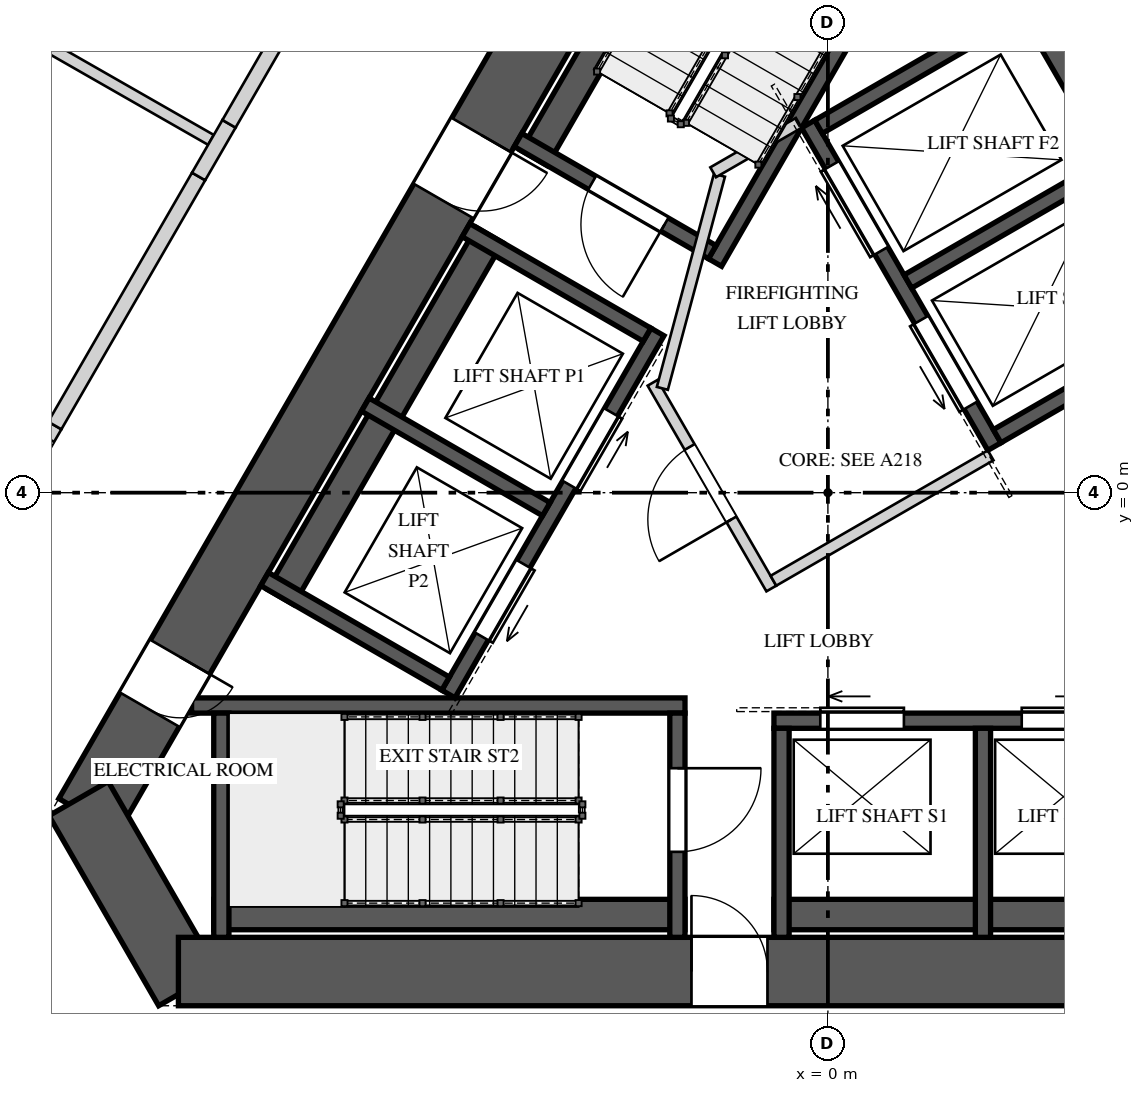
"""IFC4 building model, lengths in metres.
Left out: names, types, materials, properties, quantities, classifications, styles, units other than length and angle.
Written with IfcOpenShell. Run it as: python <this file> out.ifc"""

import sys

from ifc_helpers import new_model, si_unit, direction, frame, frame_2d, origin, place, context, subcontext, project, spatial, polyline, rectangle, outline, extrude, element, fill, save


model = new_model("IFC4")
c1 = context("Model", 3, precision=1e-05, world=origin(), true_north=direction((0.0, 1.0)))
c2 = subcontext(c1, "Body", "Model", "MODEL_VIEW")
j1 = project(units=[si_unit("LENGTHUNIT", "METRE"), si_unit("PLANEANGLEUNIT", "RADIAN")], contexts=[c1])
p1 = place(None, origin())
s1 = spatial("IfcSite", under=j1, at=p1, CompositionType="ELEMENT")
p2 = place(p1, origin())
s2 = spatial("IfcBuilding", under=s1, at=p2, CompositionType="ELEMENT")
p3 = place(p2, frame((0.0, 0.0, 125.6)))
s3 = spatial("IfcBuildingStorey", under=s2, at=p3, CompositionType="ELEMENT", Elevation=125.6)
p4 = place(p3, frame((-1.184, 10.55, 0.0), z_axis=(0.0, 0.0, 1.0), x_axis=(-0.500004814304, -0.866022624227, 0.0)))
e1 = element("IfcWall", 1, at=p4, inside=s3, PredefinedType="SHEAR", context=c2, shape_type="SweptSolid", body=[
    extrude(rectangle(XDim=17.09, YDim=0.9, at=frame_2d((8.545, 0.0))), origin(), (0.0, 0.0, 1.0), 4.0),
])
p5 = place(p4, frame((6.75, 0.0, 0.0)))
e2 = element("IfcOpeningElement", 2, at=p5, cuts=e1, PredefinedType="OPENING", context=c2, shape_type="SweptSolid", body=[
    extrude(rectangle(XDim=1.0, YDim=2.4, at=frame_2d((0.5, 1.2))), frame((0.0, 0.46, 0.0), z_axis=(0.0, -1.0, 0.0), x_axis=(1.0, 0.0, 0.0)), (0.0, 0.0, 1.0), 0.92),
])
p6 = place(p4, frame((14.678, 0.0, 0.0)))
e3 = element("IfcOpeningElement", 3, at=p6, cuts=e1, PredefinedType="OPENING", context=c2, shape_type="SweptSolid", body=[
    extrude(rectangle(XDim=0.8, YDim=2.1, at=frame_2d((0.4, 1.05))), frame((0.0, 0.46, 0.0), z_axis=(0.0, -1.0, 0.0), x_axis=(1.0, 0.0, 0.0)), (0.0, 0.0, 1.0), 0.92),
])
p7 = place(p3, frame((-9.858, -4.025, 0.0), z_axis=(0.0, 0.0, 1.0), x_axis=(0.500059191753, -0.865991226713, 0.0)))
e4 = element("IfcWall", 4, at=p7, inside=s3, PredefinedType="SHEAR", context=c2, shape_type="SweptSolid", body=[
    extrude(rectangle(XDim=2.887, YDim=0.9, at=frame_2d((1.443, 0.0))), origin(), (0.0, 0.0, 1.0), 4.0),
])
p8 = place(p3, frame((-8.545, -6.3, 0.0), z_axis=(0.0, 0.0, 1.0), x_axis=(1.0, 0.0, 0.0)))
e5 = element("IfcWall", 5, at=p8, inside=s3, PredefinedType="SHEAR", context=c2, shape_type="SweptSolid", body=[
    extrude(rectangle(XDim=17.09, YDim=0.9, at=frame_2d((8.545, 0.0))), origin(), (0.0, 0.0, 1.0), 4.0),
])
p9 = place(p8, frame((6.75, 0.0, 0.0)))
e6 = element("IfcOpeningElement", 6, at=p9, cuts=e5, PredefinedType="OPENING", context=c2, shape_type="SweptSolid", body=[
    extrude(rectangle(XDim=1.0, YDim=2.4, at=frame_2d((0.5, 1.2))), frame((0.0, 0.46, 0.0), z_axis=(0.0, -1.0, 0.0), x_axis=(1.0, 0.0, 0.0)), (0.0, 0.0, 1.0), 0.92),
])
p10 = place(p8, frame((14.678, 0.0, 0.0)))
e7 = element("IfcOpeningElement", 7, at=p10, cuts=e5, PredefinedType="OPENING", context=c2, shape_type="SweptSolid", body=[
    extrude(rectangle(XDim=0.8, YDim=2.1, at=frame_2d((0.4, 1.05))), frame((0.0, 0.46, 0.0), z_axis=(0.0, -1.0, 0.0), x_axis=(1.0, 0.0, 0.0)), (0.0, 0.0, 1.0), 0.92),
])
p11 = place(p3, frame((9.729, -4.25, 0.0), z_axis=(0.0, 0.0, 1.0), x_axis=(-0.500004814304, 0.866022624227, 0.0)))
e8 = element("IfcWall", 8, at=p11, inside=s3, PredefinedType="SHEAR", context=c2, shape_type="SweptSolid", body=[
    extrude(rectangle(XDim=17.09, YDim=0.9, at=frame_2d((8.545, 0.0))), origin(), (0.0, 0.0, 1.0), 4.0),
])
p12 = place(p11, frame((6.82, 0.0, 0.0)))
e9 = element("IfcOpeningElement", 9, at=p12, cuts=e8, PredefinedType="OPENING", context=c2, shape_type="SweptSolid", body=[
    extrude(rectangle(XDim=1.0, YDim=2.4, at=frame_2d((0.5, 1.2))), frame((0.0, 0.46, 0.0), z_axis=(0.0, -1.0, 0.0), x_axis=(1.0, 0.0, 0.0)), (0.0, 0.0, 1.0), 0.92),
])
p13 = place(p3, frame((-0.766, 9.772, 0.0), z_axis=(0.0, 0.0, 1.0), x_axis=(-0.500009909098, -0.866019682689, 0.0)))
e10 = element("IfcWall", 10, at=p13, inside=s3, PredefinedType="SOLIDWALL", context=c2, shape_type="SweptSolid", body=[
    extrude(rectangle(XDim=6.2, YDim=0.4, at=frame_2d((3.1, 0.0))), origin(), (0.0, 0.0, 1.0), 3.65),
])
p14 = place(p3, frame((1.761, 8.65, 0.0), z_axis=(0.0, 0.0, 1.0), x_axis=(-0.500010023241, -0.866019616786, 0.0)))
e11 = element("IfcWall", 11, at=p14, inside=s3, PredefinedType="SOLIDWALL", context=c2, shape_type="SweptSolid", body=[
    extrude(rectangle(XDim=6.491, YDim=0.2, at=frame_2d((3.246, 0.0))), origin(), (0.0, 0.0, 1.0), 3.65),
])
p15 = place(p3, frame((-1.521, 3.165, 0.0), z_axis=(0.0, 0.0, 1.0), x_axis=(-0.866039495442, 0.49997559174, 0.0)))
e12 = element("IfcWall", 12, at=p15, inside=s3, PredefinedType="SOLIDWALL", context=c2, shape_type="SweptSolid", body=[
    extrude(rectangle(XDim=2.95, YDim=0.2, at=frame_2d((1.475, 0.0))), origin(), (0.0, 0.0, 1.0), 3.65),
])
p16 = place(p15, frame((0.725, 0.0, 0.0)))
e13 = element("IfcOpeningElement", 13, at=p16, cuts=e12, PredefinedType="OPENING", context=c2, shape_type="SweptSolid", body=[
    extrude(rectangle(XDim=1.1, YDim=2.4, at=frame_2d((0.55, 1.2))), frame((0.0, 0.11, 0.0), z_axis=(0.0, -1.0, 0.0), x_axis=(1.0, 0.0, 0.0)), (0.0, 0.0, 1.0), 0.22),
])
p17 = place(p3, frame((-8.08, -5.55, 0.0), z_axis=(0.0, 0.0, 1.0), x_axis=(1.0, 0.0, 0.0)))
e14 = element("IfcWall", 14, at=p17, inside=s3, PredefinedType="SOLIDWALL", context=c2, shape_type="SweptSolid", body=[
    extrude(rectangle(XDim=6.2, YDim=0.4, at=frame_2d((3.1, 0.0))), origin(), (0.0, 0.0, 1.0), 3.65),
])
p18 = place(p3, frame((-8.372, -2.8, 0.0), z_axis=(0.0, 0.0, 1.0), x_axis=(1.0, 0.0, 0.0)))
e15 = element("IfcWall", 15, at=p18, inside=s3, PredefinedType="SOLIDWALL", context=c2, shape_type="SweptSolid", body=[
    extrude(rectangle(XDim=6.492, YDim=0.2, at=frame_2d((3.246, 0.0))), origin(), (0.0, 0.0, 1.0), 3.65),
])
p19 = place(p3, frame((-7.98, -2.9, 0.0), z_axis=(0.0, 0.0, 1.0), x_axis=(0.0, -1.0, 0.0)))
e16 = element("IfcWall", 16, at=p19, inside=s3, PredefinedType="SOLIDWALL", context=c2, shape_type="SweptSolid", body=[
    extrude(rectangle(XDim=2.95, YDim=0.2, at=frame_2d((1.475, 0.0))), origin(), (0.0, 0.0, 1.0), 3.65),
])
p20 = place(p3, frame((-1.98, -2.9, 0.0), z_axis=(0.0, 0.0, 1.0), x_axis=(0.0, -1.0, 0.0)))
e17 = element("IfcWall", 17, at=p20, inside=s3, PredefinedType="SOLIDWALL", context=c2, shape_type="SweptSolid", body=[
    extrude(rectangle(XDim=2.95, YDim=0.2, at=frame_2d((1.475, 0.0))), origin(), (0.0, 0.0, 1.0), 3.65),
])
p21 = place(p20, frame((0.725, 0.0, 0.0)))
e18 = element("IfcOpeningElement", 18, at=p21, cuts=e17, PredefinedType="OPENING", context=c2, shape_type="SweptSolid", body=[
    extrude(rectangle(XDim=1.1, YDim=2.4, at=frame_2d((0.55, 1.2))), frame((0.0, 0.11, 0.0), z_axis=(0.0, -1.0, 0.0), x_axis=(1.0, 0.0, 0.0)), (0.0, 0.0, 1.0), 0.22),
])
p22 = place(p3, frame((-2.243, 2.115, 0.0), z_axis=(0.0, 0.0, 1.0), x_axis=(-0.499996545922, -0.866027397988, 0.0)))
e19 = element("IfcWall", 19, at=p22, inside=s3, PredefinedType="SOLIDWALL", context=c2, shape_type="SweptSolid", body=[
    extrude(rectangle(XDim=5.5, YDim=0.2, at=frame_2d((2.75, 0.0))), origin(), (0.0, 0.0, 1.0), 3.65),
])
p23 = place(p22, frame((1.22, 0.0, 0.0)))
e20 = element("IfcOpeningElement", 20, at=p23, cuts=e19, PredefinedType="OPENING", context=c2, shape_type="SweptSolid", body=[
    extrude(rectangle(XDim=1.1, YDim=2.1, at=frame_2d((0.55, 1.05))), frame((0.0, 0.11, 0.0), z_axis=(0.0, -1.0, 0.0), x_axis=(1.0, 0.0, 0.0)), (0.0, 0.0, 1.0), 0.22),
])
p24 = place(p22, frame((3.525, 0.0, 0.0)))
e21 = element("IfcOpeningElement", 21, at=p24, cuts=e19, PredefinedType="OPENING", context=c2, shape_type="SweptSolid", body=[
    extrude(rectangle(XDim=1.1, YDim=2.1, at=frame_2d((0.55, 1.05))), frame((0.0, 0.11, 0.0), z_axis=(0.0, -1.0, 0.0), x_axis=(1.0, 0.0, 0.0)), (0.0, 0.0, 1.0), 0.22),
])
p25 = place(p3, frame((-4.451, 3.39, 0.0), z_axis=(0.0, 0.0, 1.0), x_axis=(-0.499996545922, -0.866027397988, 0.0)))
e22 = element("IfcWall", 22, at=p25, inside=s3, PredefinedType="SOLIDWALL", context=c2, shape_type="SweptSolid", body=[
    extrude(rectangle(XDim=5.5, YDim=0.4, at=frame_2d((2.75, 0.0))), origin(), (0.0, 0.0, 1.0), 3.65),
])
for number, where, z_axis, x_axis in (
    (23, (-2.38, 2.078, 0.0), (0.0, 0.0, 1.0), (-0.866, 0.5, 0.0)),
    (24, (-3.705, -0.217, 0.0), (0.0, 0.0, 1.0), (-0.866, 0.5, 0.0)),
):
    element("IfcWall", number, at=place(p3, frame(where, z_axis=z_axis, x_axis=x_axis)), inside=s3, PredefinedType="SOLIDWALL", context=c2, shape_type="SweptSolid", body=[
        extrude(rectangle(XDim=2.75, YDim=0.2, at=frame_2d((1.375, 0.0))), origin(), (0.0, 0.0, 1.0), 3.65),
    ])
p26 = place(p3, frame((-5.03, -2.512, 0.0), z_axis=(0.0, 0.0, 1.0), x_axis=(-0.866005201286, 0.500034990121, 0.0)))
e25 = element("IfcWall", 25, at=p26, inside=s3, PredefinedType="SOLIDWALL", context=c2, shape_type="SweptSolid", body=[
    extrude(rectangle(XDim=2.75, YDim=0.2, at=frame_2d((1.375, 0.0))), origin(), (0.0, 0.0, 1.0), 3.65),
])
p27 = place(p3, frame((-0.71, -3.0, 0.0), z_axis=(0.0, 0.0, 1.0), x_axis=(1.0, 0.0, 0.0)))
e26 = element("IfcWall", 26, at=p27, inside=s3, PredefinedType="SOLIDWALL", context=c2, shape_type="SweptSolid", body=[
    extrude(rectangle(XDim=5.5, YDim=0.2, at=frame_2d((2.75, 0.0))), origin(), (0.0, 0.0, 1.0), 3.65),
])
p28 = place(p27, frame((0.61, 0.0, 0.0)))
e27 = element("IfcOpeningElement", 27, at=p28, cuts=e26, PredefinedType="OPENING", context=c2, shape_type="SweptSolid", body=[
    extrude(rectangle(XDim=1.1, YDim=2.1, at=frame_2d((0.55, 1.05))), frame((0.0, 0.11, 0.0), z_axis=(0.0, -1.0, 0.0), x_axis=(1.0, 0.0, 0.0)), (0.0, 0.0, 1.0), 0.22),
])
p29 = place(p27, frame((3.26, 0.0, 0.0)))
e28 = element("IfcOpeningElement", 28, at=p29, cuts=e26, PredefinedType="OPENING", context=c2, shape_type="SweptSolid", body=[
    extrude(rectangle(XDim=1.1, YDim=2.1, at=frame_2d((0.55, 1.05))), frame((0.0, 0.11, 0.0), z_axis=(0.0, -1.0, 0.0), x_axis=(1.0, 0.0, 0.0)), (0.0, 0.0, 1.0), 0.22),
])
p30 = place(p3, frame((-0.71, -5.55, 0.0), z_axis=(0.0, 0.0, 1.0), x_axis=(1.0, 0.0, 0.0)))
e29 = element("IfcWall", 29, at=p30, inside=s3, PredefinedType="SOLIDWALL", context=c2, shape_type="SweptSolid", body=[
    extrude(rectangle(XDim=5.5, YDim=0.4, at=frame_2d((2.75, 0.0))), origin(), (0.0, 0.0, 1.0), 3.65),
])
for number, where, z_axis, x_axis in (
    (30, (-0.61, -3.1, 0.0), (0.0, 0.0, 1.0), (0.0, -1.0, 0.0)),
    (31, (2.04, -3.1, 0.0), (0.0, 0.0, 1.0), (0.0, -1.0, 0.0)),
):
    element("IfcWall", number, at=place(p3, frame(where, z_axis=z_axis, x_axis=x_axis)), inside=s3, PredefinedType="SOLIDWALL", context=c2, shape_type="SweptSolid", body=[
        extrude(rectangle(XDim=2.75, YDim=0.2, at=frame_2d((1.375, 0.0))), origin(), (0.0, 0.0, 1.0), 3.65),
    ])
p31 = place(p3, frame((2.19, 0.606, 0.0), z_axis=(0.0, 0.0, 1.0), x_axis=(-0.500002801628, 0.866023786258, 0.0)))
e32 = element("IfcWall", 32, at=p31, inside=s3, PredefinedType="SOLIDWALL", context=c2, shape_type="SweptSolid", body=[
    extrude(rectangle(XDim=4.9, YDim=0.2, at=frame_2d((2.45, 0.0))), origin(), (0.0, 0.0, 1.0), 3.65),
])
p32 = place(p31, frame((0.625, 0.0, 0.0)))
e33 = element("IfcOpeningElement", 33, at=p32, cuts=e32, PredefinedType="OPENING", context=c2, shape_type="SweptSolid", body=[
    extrude(rectangle(XDim=1.3, YDim=2.1, at=frame_2d((0.65, 1.05))), frame((0.0, 0.11, 0.0), z_axis=(0.0, -1.0, 0.0), x_axis=(1.0, 0.0, 0.0)), (0.0, 0.0, 1.0), 0.22),
])
p33 = place(p31, frame((2.975, 0.0, 0.0)))
e34 = element("IfcOpeningElement", 34, at=p33, cuts=e32, PredefinedType="OPENING", context=c2, shape_type="SweptSolid", body=[
    extrude(rectangle(XDim=1.3, YDim=2.1, at=frame_2d((0.65, 1.05))), frame((0.0, 0.11, 0.0), z_axis=(0.0, -1.0, 0.0), x_axis=(1.0, 0.0, 0.0)), (0.0, 0.0, 1.0), 0.22),
])
p34 = place(p3, frame((5.092, 2.281, 0.0), z_axis=(0.0, 0.0, 1.0), x_axis=(-0.500018594424, 0.866014668023, 0.0)))
e35 = element("IfcWall", 35, at=p34, inside=s3, PredefinedType="SOLIDWALL", context=c2, shape_type="SweptSolid", body=[
    extrude(rectangle(XDim=4.9, YDim=0.4, at=frame_2d((2.45, 0.0))), origin(), (0.0, 0.0, 1.0), 3.65),
])
for number, where, z_axis, x_axis in (
    (36, (2.227, 0.743, 0.0), (0.0, 0.0, 1.0), (0.866, 0.5, 0.0)),
    (37, (1.052, 2.778, 0.0), (0.0, 0.0, 1.0), (0.866, 0.5, 0.0)),
):
    element("IfcWall", number, at=place(p3, frame(where, z_axis=z_axis, x_axis=x_axis)), inside=s3, PredefinedType="SOLIDWALL", context=c2, shape_type="SweptSolid", body=[
        extrude(rectangle(XDim=3.55, YDim=0.2, at=frame_2d((1.775, 0.0))), origin(), (0.0, 0.0, 1.0), 3.65),
    ])
p35 = place(p3, frame((-0.123, 4.813, 0.0), z_axis=(0.0, 0.0, 1.0), x_axis=(0.865995461329, 0.500051858269, 0.0)))
e38 = element("IfcWall", 38, at=p35, inside=s3, PredefinedType="SOLIDWALL", context=c2, shape_type="SweptSolid", body=[
    extrude(rectangle(XDim=3.55, YDim=0.2, at=frame_2d((1.775, 0.0))), origin(), (0.0, 0.0, 1.0), 3.65),
])
p36 = place(p3, frame((-0.744, -1.261, 0.0), z_axis=(0.0, 0.0, 1.0), x_axis=(-0.500004234368, 0.866022959057, 0.0)))
e39 = element("IfcWall", 39, at=p36, inside=s3, PredefinedType="PARTITIONING", context=c2, shape_type="SweptSolid", body=[
    extrude(rectangle(XDim=3.125, YDim=0.15, at=frame_2d((1.562, 0.0))), origin(), (0.0, 0.0, 1.0), 3.65),
])
p37 = place(p36, frame((1.05, 0.0, 0.0)))
e40 = element("IfcOpeningElement", 40, at=p37, cuts=e39, PredefinedType="OPENING", context=c2, shape_type="SweptSolid", body=[
    extrude(rectangle(XDim=1.1, YDim=2.4, at=frame_2d((0.55, 1.2))), frame((0.0, 0.085, 0.0), z_axis=(0.0, -1.0, 0.0), x_axis=(1.0, 0.0, 0.0)), (0.0, 0.0, 1.0), 0.17),
])
p38 = place(p3, frame((-0.717, -1.159, 0.0), z_axis=(0.0, 0.0, 1.0), x_axis=(0.866008176907, 0.50002983664, 0.0)))
e41 = element("IfcWall", 41, at=p38, inside=s3, PredefinedType="PARTITIONING", context=c2, shape_type="SweptSolid", body=[
    extrude(rectangle(XDim=3.3, YDim=0.15, at=frame_2d((1.65, 0.0))), origin(), (0.0, 0.0, 1.0), 3.65),
])
p39 = place(p3, frame((-2.178, 1.372, 0.0), z_axis=(0.0, 0.0, 1.0), x_axis=(0.258808958833, 0.96592852884, 0.0)))
e42 = element("IfcWall", 42, at=p39, inside=s3, PredefinedType="PARTITIONING", context=c2, shape_type="SweptSolid", body=[
    extrude(rectangle(XDim=2.903, YDim=0.15, at=frame_2d((1.451, 0.0))), origin(), (0.0, 0.0, 1.0), 3.65),
])
p40 = place(p3, frame((-1.51, 4.215, 0.0), z_axis=(0.0, 0.0, 1.0), x_axis=(0.866085525409, 0.49989585183, 0.0)))
e43 = element("IfcWall", 43, at=p40, inside=s3, PredefinedType="PARTITIONING", context=c2, shape_type="SweptSolid", body=[
    extrude(rectangle(XDim=1.3, YDim=0.15, at=frame_2d((0.65, 0.0))), origin(), (0.0, 0.0, 1.0), 3.65),
])
p41 = place(p3, frame((-8.117, 4.641, 0.0), z_axis=(0.0, 0.0, 1.0), x_axis=(-0.868089906789, 0.496407004111, 0.0)))
e44 = element("IfcWall", 44, at=p41, inside=s3, PredefinedType="PARTITIONING", context=c2, shape_type="SweptSolid", body=[
    extrude(rectangle(XDim=9.611, YDim=0.15, at=frame_2d((4.806, 0.0))), origin(), (0.0, 0.0, 1.0), 2.75),
])
p42 = place(p3, frame((-10.842, -0.279, 0.0), z_axis=(0.0, 0.0, 1.0), x_axis=(0.500032109083, 0.866006864803, 0.0)))
e45 = element("IfcWall", 45, at=p42, inside=s3, PredefinedType="SOLIDWALL", context=c2, shape_type="SweptSolid", body=[
    extrude(outline(polyline([(0.0, 0.0), (1.342, 0.0), (1.342, 2.95), (0.557, 2.95), (0.557, 3.65), (0.0, 3.65), (0.0, 0.0)])), frame((0.0, 0.1, 0.0), z_axis=(0.0, -1.0, 0.0), x_axis=(1.0, 0.0, 0.0)), (0.0, 0.0, 1.0), 0.2),
])
p43 = place(p42, frame((0.05, 0.0, 0.0)))
e46 = element("IfcOpeningElement", 46, at=p43, cuts=e45, PredefinedType="OPENING", context=c2, shape_type="SweptSolid", body=[
    extrude(rectangle(XDim=1.1, YDim=2.4, at=frame_2d((0.55, 1.2))), frame((0.0, 0.11, 0.0), z_axis=(0.0, -1.0, 0.0), x_axis=(1.0, 0.0, 0.0)), (0.0, 0.0, 1.0), 0.22),
])
p44 = place(p3, frame((-10.171, 0.884, 0.0), z_axis=(0.0, 0.0, 1.0), x_axis=(0.499998034377, 0.866026538634, 0.0)))
e47 = element("IfcWall", 47, at=p44, inside=s3, PredefinedType="SOLIDWALL", context=c2, shape_type="SweptSolid", body=[
    extrude(rectangle(XDim=3.783, YDim=0.2, at=frame_2d((1.892, 0.0))), origin(), (0.0, 0.0, 1.0), 3.65),
])
p45 = place(p3, frame((-8.279, 4.16, 0.0), z_axis=(0.0, 0.0, 1.0), x_axis=(0.500109828528, 0.865961984968, 0.0)))
e48 = element("IfcWall", 48, at=p45, inside=s3, PredefinedType="SOLIDWALL", context=c2, shape_type="SweptSolid", body=[
    extrude(rectangle(XDim=0.8, YDim=0.2, at=frame_2d((0.4, 0.0))), origin(), (0.0, 0.0, 1.0), 2.75),
])
p46 = place(p3, frame((-7.879, 4.853, 0.0), z_axis=(0.0, 0.0, 1.0), x_axis=(0.499948868167, 0.866054922749, 0.0)))
e49 = element("IfcWall", 49, at=p46, inside=s3, PredefinedType="SOLIDWALL", context=c2, shape_type="SweptSolid", body=[
    extrude(rectangle(XDim=2.178, YDim=0.2, at=frame_2d((1.089, 0.0))), origin(), (0.0, 0.0, 1.0), 3.65),
])
p47 = place(p16, origin())
e50 = element("IfcDoor", 50, at=p47, inside=s3, OperationType="SINGLE_SWING_RIGHT", PredefinedType="DOOR", context=c2, shape_type="SweptSolid", body=[
    extrude(rectangle(XDim=1.1, YDim=2.4, at=frame_2d((0.55, 1.2))), frame((0.0, 0.025, 0.0), z_axis=(0.0, -1.0, 0.0), x_axis=(1.0, 0.0, 0.0)), (0.0, 0.0, 1.0), 0.05),
])
fill(e13, e50)
p48 = place(p21, origin())
e51 = element("IfcDoor", 51, at=p48, inside=s3, OperationType="SINGLE_SWING_LEFT", PredefinedType="DOOR", context=c2, shape_type="SweptSolid", body=[
    extrude(rectangle(XDim=1.1, YDim=2.4, at=frame_2d((0.55, 1.2))), frame((0.0, 0.025, 0.0), z_axis=(0.0, -1.0, 0.0), x_axis=(1.0, 0.0, 0.0)), (0.0, 0.0, 1.0), 0.05),
])
fill(e18, e51)
p49 = place(p23, origin())
e52 = element("IfcDoor", 52, at=p49, inside=s3, OperationType="SLIDING_TO_LEFT", PredefinedType="DOOR", context=c2, shape_type="SweptSolid", body=[
    extrude(rectangle(XDim=1.1, YDim=2.1, at=frame_2d((0.55, 1.05))), frame((0.0, 0.025, 0.0), z_axis=(0.0, -1.0, 0.0), x_axis=(1.0, 0.0, 0.0)), (0.0, 0.0, 1.0), 0.05),
])
fill(e20, e52)
p50 = place(p24, origin())
e53 = element("IfcDoor", 53, at=p50, inside=s3, OperationType="SLIDING_TO_RIGHT", PredefinedType="DOOR", context=c2, shape_type="SweptSolid", body=[
    extrude(rectangle(XDim=1.1, YDim=2.1, at=frame_2d((0.55, 1.05))), frame((0.0, 0.025, 0.0), z_axis=(0.0, -1.0, 0.0), x_axis=(1.0, 0.0, 0.0)), (0.0, 0.0, 1.0), 0.05),
])
fill(e21, e53)
p51 = place(p28, origin())
e54 = element("IfcDoor", 54, at=p51, inside=s3, OperationType="SLIDING_TO_LEFT", PredefinedType="DOOR", context=c2, shape_type="SweptSolid", body=[
    extrude(rectangle(XDim=1.1, YDim=2.1, at=frame_2d((0.55, 1.05))), frame((0.0, 0.025, 0.0), z_axis=(0.0, -1.0, 0.0), x_axis=(1.0, 0.0, 0.0)), (0.0, 0.0, 1.0), 0.05),
])
fill(e27, e54)
p52 = place(p29, origin())
e55 = element("IfcDoor", 55, at=p52, inside=s3, OperationType="SLIDING_TO_RIGHT", PredefinedType="DOOR", context=c2, shape_type="SweptSolid", body=[
    extrude(rectangle(XDim=1.1, YDim=2.1, at=frame_2d((0.55, 1.05))), frame((0.0, 0.025, 0.0), z_axis=(0.0, -1.0, 0.0), x_axis=(1.0, 0.0, 0.0)), (0.0, 0.0, 1.0), 0.05),
])
fill(e28, e55)
p53 = place(p32, origin())
e56 = element("IfcDoor", 56, at=p53, inside=s3, OperationType="SLIDING_TO_LEFT", PredefinedType="DOOR", context=c2, shape_type="SweptSolid", body=[
    extrude(rectangle(XDim=1.3, YDim=2.1, at=frame_2d((0.65, 1.05))), frame((0.0, 0.025, 0.0), z_axis=(0.0, -1.0, 0.0), x_axis=(1.0, 0.0, 0.0)), (0.0, 0.0, 1.0), 0.05),
])
fill(e33, e56)
p54 = place(p33, origin())
e57 = element("IfcDoor", 57, at=p54, inside=s3, OperationType="SLIDING_TO_RIGHT", PredefinedType="DOOR", context=c2, shape_type="SweptSolid", body=[
    extrude(rectangle(XDim=1.3, YDim=2.1, at=frame_2d((0.65, 1.05))), frame((0.0, 0.025, 0.0), z_axis=(0.0, -1.0, 0.0), x_axis=(1.0, 0.0, 0.0)), (0.0, 0.0, 1.0), 0.05),
])
fill(e34, e57)
p55 = place(p37, origin())
e58 = element("IfcDoor", 58, at=p55, inside=s3, OperationType="SINGLE_SWING_LEFT", PredefinedType="DOOR", context=c2, shape_type="SweptSolid", body=[
    extrude(rectangle(XDim=1.1, YDim=2.4, at=frame_2d((0.55, 1.2))), frame((0.0, 0.025, 0.0), z_axis=(0.0, -1.0, 0.0), x_axis=(1.0, 0.0, 0.0)), (0.0, 0.0, 1.0), 0.05),
])
fill(e40, e58)
p56 = place(p5, origin())
e59 = element("IfcDoor", 59, at=p56, inside=s3, OperationType="SINGLE_SWING_RIGHT", PredefinedType="DOOR", context=c2, shape_type="SweptSolid", body=[
    extrude(rectangle(XDim=1.0, YDim=2.4, at=frame_2d((0.5, 1.2))), frame((0.0, 0.025, 0.0), z_axis=(0.0, -1.0, 0.0), x_axis=(1.0, 0.0, 0.0)), (0.0, 0.0, 1.0), 0.05),
])
fill(e2, e59)
p57 = place(p9, origin())
e60 = element("IfcDoor", 60, at=p57, inside=s3, OperationType="SINGLE_SWING_LEFT", PredefinedType="DOOR", context=c2, shape_type="SweptSolid", body=[
    extrude(rectangle(XDim=1.0, YDim=2.4, at=frame_2d((0.5, 1.2))), frame((0.0, 0.025, 0.0), z_axis=(0.0, -1.0, 0.0), x_axis=(1.0, 0.0, 0.0)), (0.0, 0.0, 1.0), 0.05),
])
fill(e6, e60)
p58 = place(p6, origin())
e61 = element("IfcDoor", 61, at=p58, inside=s3, OperationType="SINGLE_SWING_LEFT", PredefinedType="DOOR", context=c2, shape_type="SweptSolid", body=[
    extrude(rectangle(XDim=0.8, YDim=2.1, at=frame_2d((0.4, 1.05))), frame((0.0, 0.025, 0.0), z_axis=(0.0, -1.0, 0.0), x_axis=(1.0, 0.0, 0.0)), (0.0, 0.0, 1.0), 0.05),
])
fill(e3, e61)
save(model, sys.argv[1])
